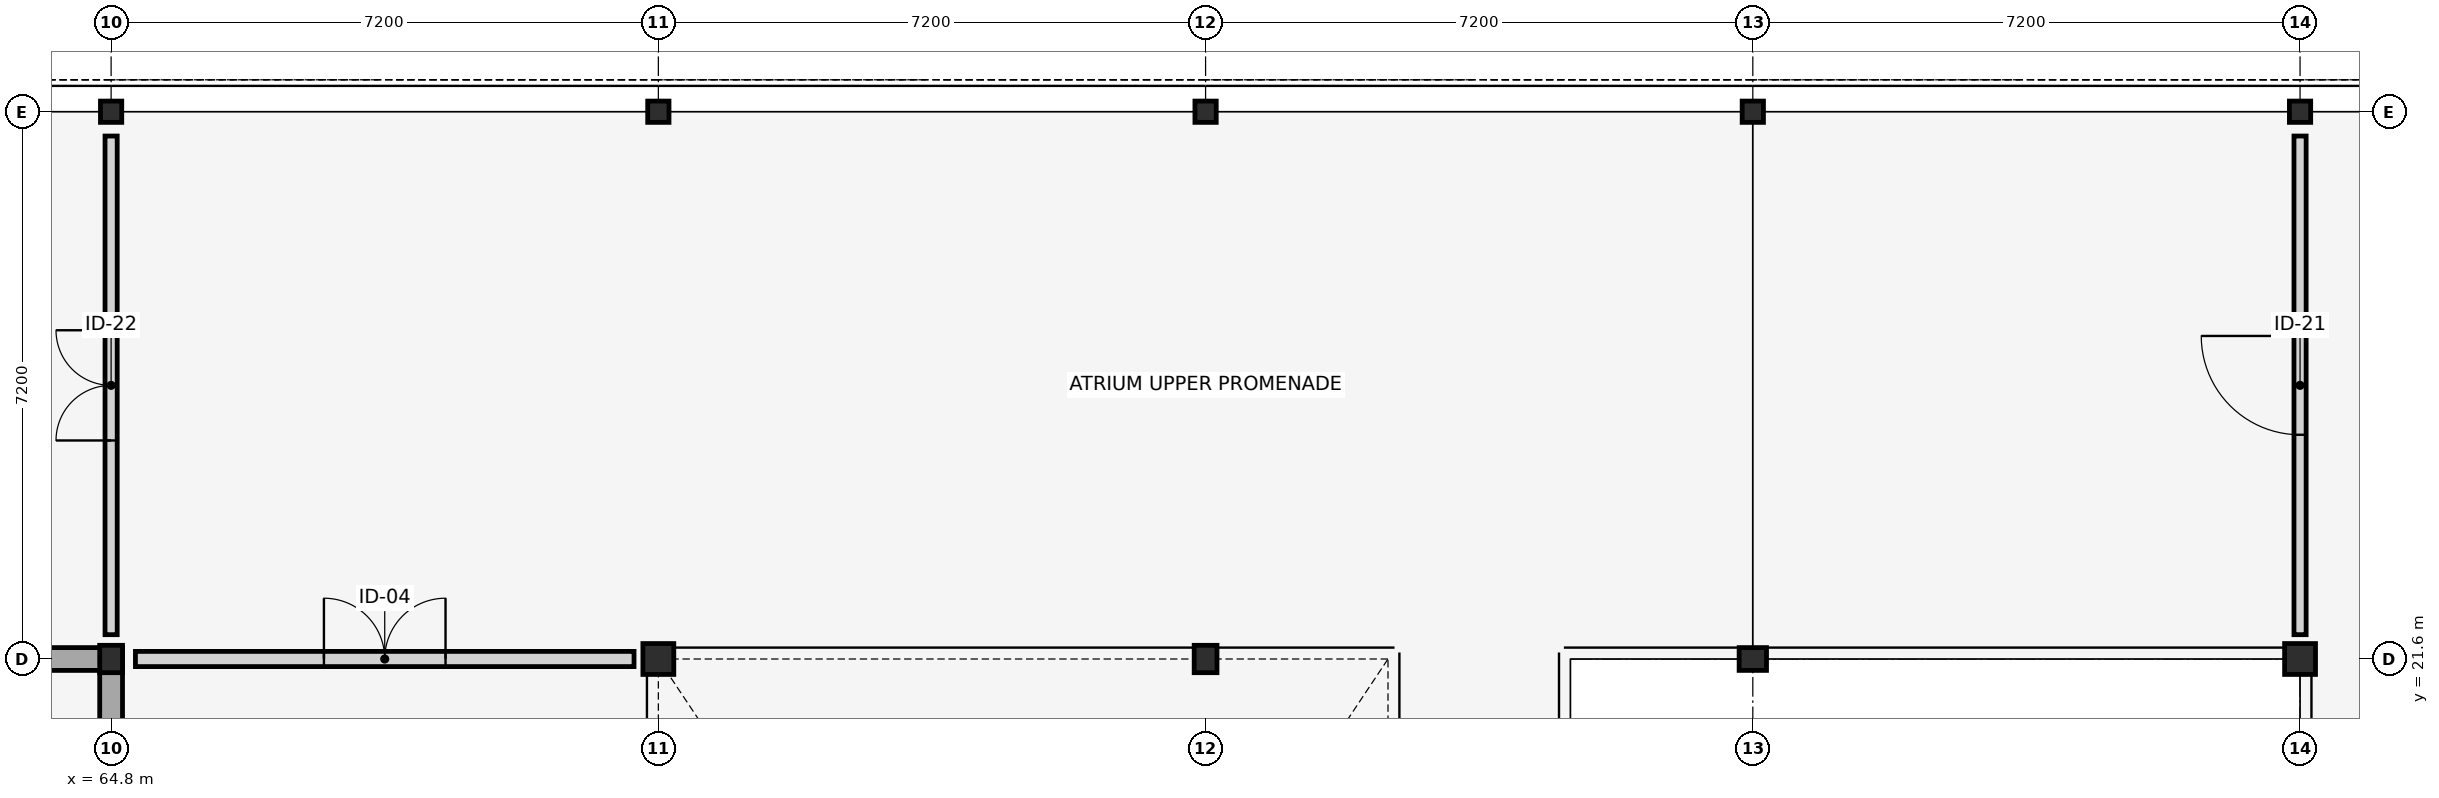
"""IFC4 building model, lengths in metres.
Left out: names, types, materials, properties, quantities, classifications, styles, units other than length and angle.
Written with IfcOpenShell. Run it as: python <this file> out.ifc"""

import sys

from ifc_helpers import new_model, si_unit, direction, frame, frame_2d, origin, origin_2d, place, context, subcontext, project, spatial, rectangle, hollow_circle, i_section, extrude, element, fill, save


model = new_model("IFC4")
c1 = context("Model", 3, precision=1e-05, world=origin(), true_north=direction((0.0, 1.0)))
c2 = subcontext(c1, "Body", "Model", "MODEL_VIEW")
j1 = project(units=[si_unit("LENGTHUNIT", "METRE"), si_unit("PLANEANGLEUNIT", "RADIAN")], contexts=[c1])
p1 = place(None, origin())
s1 = spatial("IfcSite", under=j1, at=p1, CompositionType="ELEMENT")
p2 = place(p1, origin())
s2 = spatial("IfcBuilding", under=s1, at=p2, CompositionType="ELEMENT")
p3 = place(p2, frame((0.0, 0.0, 12.9)))
s3 = spatial("IfcBuildingStorey", under=s2, at=p3, CompositionType="ELEMENT", Elevation=12.9)
p4 = place(p3, frame((64.8, 21.6, 0.0), z_axis=(0.0, 0.0, 1.0), x_axis=(1.0, 0.0, 0.0)))
e1 = element("IfcColumn", 1, at=p4, inside=s3, PredefinedType="COLUMN", context=c2, shape_type="SweptSolid", body=[
    extrude(i_section(OverallWidth=0.3, OverallDepth=0.36, WebThickness=0.012, FlangeThickness=0.022, FilletRadius=0.027, at=origin_2d()), origin(), (0.0, 0.0, 1.0), 4.2),
])
p5 = place(p3, frame((64.8, 28.8, 0.0), z_axis=(0.0, 0.0, 1.0), x_axis=(0.0, 1.0, 0.0)))
e2 = element("IfcColumn", 2, at=p5, inside=s3, PredefinedType="COLUMN", context=c2, shape_type="SweptSolid", body=[
    extrude(i_section(OverallWidth=0.28, OverallDepth=0.28, WebThickness=0.01, FlangeThickness=0.018, FilletRadius=0.024, at=origin_2d()), origin(), (0.0, 0.0, 1.0), 4.2),
])
p6 = place(p3, frame((72.0, 21.6, 0.0), z_axis=(0.0, 0.0, 1.0), x_axis=(0.0, 1.0, 0.0)))
e3 = element("IfcColumn", 3, at=p6, inside=s3, PredefinedType="COLUMN", context=c2, shape_type="SweptSolid", body=[
    extrude(hollow_circle(Radius=0.203, WallThickness=0.016, at=origin_2d()), origin(), (0.0, 0.0, 1.0), 4.2),
])
p7 = place(p3, frame((72.0, 28.8, 0.0), z_axis=(0.0, 0.0, 1.0), x_axis=(1.0, 0.0, 0.0)))
e4 = element("IfcColumn", 4, at=p7, inside=s3, PredefinedType="COLUMN", context=c2, shape_type="SweptSolid", body=[
    extrude(i_section(OverallWidth=0.28, OverallDepth=0.28, WebThickness=0.01, FlangeThickness=0.018, FilletRadius=0.024, at=origin_2d()), origin(), (0.0, 0.0, 1.0), 4.2),
])
p8 = place(p3, frame((79.2, 21.6, 0.0), z_axis=(0.0, 0.0, 1.0), x_axis=(1.0, 0.0, 0.0)))
e5 = element("IfcColumn", 5, at=p8, inside=s3, PredefinedType="COLUMN", context=c2, shape_type="SweptSolid", body=[
    extrude(i_section(OverallWidth=0.3, OverallDepth=0.36, WebThickness=0.012, FlangeThickness=0.022, FilletRadius=0.027, at=origin_2d()), origin(), (0.0, 0.0, 1.0), 4.2),
])
p9 = place(p3, frame((79.2, 28.8, 0.0), z_axis=(0.0, 0.0, 1.0), x_axis=(0.0, 1.0, 0.0)))
e6 = element("IfcColumn", 6, at=p9, inside=s3, PredefinedType="COLUMN", context=c2, shape_type="SweptSolid", body=[
    extrude(i_section(OverallWidth=0.28, OverallDepth=0.28, WebThickness=0.01, FlangeThickness=0.018, FilletRadius=0.024, at=origin_2d()), origin(), (0.0, 0.0, 1.0), 4.2),
])
p10 = place(p3, frame((86.4, 21.6, 0.0), z_axis=(0.0, 0.0, 1.0), x_axis=(0.0, 1.0, 0.0)))
e7 = element("IfcColumn", 7, at=p10, inside=s3, PredefinedType="COLUMN", context=c2, shape_type="SweptSolid", body=[
    extrude(i_section(OverallWidth=0.3, OverallDepth=0.36, WebThickness=0.012, FlangeThickness=0.022, FilletRadius=0.027, at=origin_2d()), origin(), (0.0, 0.0, 1.0), 4.2),
])
p11 = place(p3, frame((86.4, 28.8, 0.0), z_axis=(0.0, 0.0, 1.0), x_axis=(1.0, 0.0, 0.0)))
e8 = element("IfcColumn", 8, at=p11, inside=s3, PredefinedType="COLUMN", context=c2, shape_type="SweptSolid", body=[
    extrude(i_section(OverallWidth=0.28, OverallDepth=0.28, WebThickness=0.01, FlangeThickness=0.018, FilletRadius=0.024, at=origin_2d()), origin(), (0.0, 0.0, 1.0), 4.2),
])
p12 = place(p3, frame((93.6, 21.6, 0.0), z_axis=(0.0, 0.0, 1.0), x_axis=(1.0, 0.0, 0.0)))
e9 = element("IfcColumn", 9, at=p12, inside=s3, PredefinedType="COLUMN", context=c2, shape_type="SweptSolid", body=[
    extrude(hollow_circle(Radius=0.203, WallThickness=0.016, at=origin_2d()), origin(), (0.0, 0.0, 1.0), 4.2),
])
p13 = place(p3, frame((93.6, 28.8, 0.0), z_axis=(0.0, 0.0, 1.0), x_axis=(0.0, 1.0, 0.0)))
e10 = element("IfcColumn", 10, at=p13, inside=s3, PredefinedType="COLUMN", context=c2, shape_type="SweptSolid", body=[
    extrude(i_section(OverallWidth=0.28, OverallDepth=0.28, WebThickness=0.01, FlangeThickness=0.018, FilletRadius=0.024, at=origin_2d()), origin(), (0.0, 0.0, 1.0), 4.2),
])
p14 = place(p3, frame((57.6, 21.6, 0.0), z_axis=(0.0, 0.0, 1.0), x_axis=(1.0, 0.0, 0.0)))
e11 = element("IfcWall", 11, at=p14, inside=s3, PredefinedType="SHEAR", context=c2, shape_type="SweptSolid", body=[
    extrude(rectangle(XDim=7.35, YDim=0.3, at=frame_2d((3.675, 0.0))), origin(), (0.0, 0.0, 1.0), 3.96),
])
p15 = place(p3, frame((64.8, 7.35, 0.0), z_axis=(0.0, 0.0, 1.0), x_axis=(0.0, 1.0, 0.0)))
e12 = element("IfcWall", 12, at=p15, inside=s3, PredefinedType="SHEAR", context=c2, shape_type="SweptSolid", body=[
    extrude(rectangle(XDim=14.1, YDim=0.3, at=frame_2d((7.05, 0.0))), origin(), (0.0, 0.0, 1.0), 3.96),
])
p16 = place(p15, frame((3.55, 0.0, 0.0)))
e13 = element("IfcOpeningElement", 13, at=p16, cuts=e12, PredefinedType="OPENING", context=c2, shape_type="SweptSolid", body=[
    extrude(rectangle(XDim=1.3, YDim=2.2, at=frame_2d((0.65, 1.1))), frame((0.0, 0.16, 0.0), z_axis=(0.0, -1.0, 0.0), x_axis=(1.0, 0.0, 0.0)), (0.0, 0.0, 1.0), 0.32),
])
p17 = place(p15, frame((7.85, 0.0, 0.0)))
e14 = element("IfcOpeningElement", 14, at=p17, cuts=e12, PredefinedType="OPENING", context=c2, shape_type="SweptSolid", body=[
    extrude(rectangle(XDim=1.05, YDim=2.15, at=frame_2d((0.525, 1.075))), frame((0.0, 0.16, 0.0), z_axis=(0.0, -1.0, 0.0), x_axis=(1.0, 0.0, 0.0)), (0.0, 0.0, 1.0), 0.32),
])
p18 = place(p15, frame((10.55, 0.0, 0.0)))
e15 = element("IfcOpeningElement", 15, at=p18, cuts=e12, PredefinedType="OPENING", context=c2, shape_type="SweptSolid", body=[
    extrude(rectangle(XDim=1.0, YDim=2.15, at=frame_2d((0.5, 1.075))), frame((0.0, 0.16, 0.0), z_axis=(0.0, -1.0, 0.0), x_axis=(1.0, 0.0, 0.0)), (0.0, 0.0, 1.0), 0.32),
])
p19 = place(p3, frame((65.12, 21.6, 0.0), z_axis=(0.0, 0.0, 1.0), x_axis=(1.0, 0.0, 0.0)))
e16 = element("IfcWall", 16, at=p19, inside=s3, PredefinedType="PARTITIONING", context=c2, shape_type="SweptSolid", body=[
    extrude(rectangle(XDim=6.56, YDim=0.2, at=frame_2d((3.28, 0.0))), origin(), (0.0, 0.0, 1.0), 3.15),
])
p20 = place(p19, frame((2.48, 0.0, 0.0)))
e17 = element("IfcOpeningElement", 17, at=p20, cuts=e16, PredefinedType="OPENING", context=c2, shape_type="SweptSolid", body=[
    extrude(rectangle(XDim=1.6, YDim=2.35, at=frame_2d((0.8, 1.175))), frame((0.0, 0.11, 0.0), z_axis=(0.0, -1.0, 0.0), x_axis=(1.0, 0.0, 0.0)), (0.0, 0.0, 1.0), 0.22),
])
p21 = place(p3, frame((93.6, 21.92, 0.0), z_axis=(0.0, 0.0, 1.0), x_axis=(0.0, 1.0, 0.0)))
e18 = element("IfcWall", 18, at=p21, inside=s3, PredefinedType="PARTITIONING", context=c2, shape_type="SweptSolid", body=[
    extrude(rectangle(XDim=6.56, YDim=0.16, at=frame_2d((3.28, 0.0))), origin(), (0.0, 0.0, 1.0), 3.15),
])
p22 = place(p21, frame((2.63, 0.0, 0.0)))
e19 = element("IfcOpeningElement", 19, at=p22, cuts=e18, PredefinedType="OPENING", context=c2, shape_type="SweptSolid", body=[
    extrude(rectangle(XDim=1.3, YDim=2.45, at=frame_2d((0.65, 1.225))), frame((0.0, 0.09, 0.0), z_axis=(0.0, -1.0, 0.0), x_axis=(1.0, 0.0, 0.0)), (0.0, 0.0, 1.0), 0.18),
])
p23 = place(p3, frame((64.8, 21.92, 0.0), z_axis=(0.0, 0.0, 1.0), x_axis=(0.0, 1.0, 0.0)))
e20 = element("IfcWall", 20, at=p23, inside=s3, PredefinedType="PARTITIONING", context=c2, shape_type="SweptSolid", body=[
    extrude(rectangle(XDim=6.56, YDim=0.16, at=frame_2d((3.28, 0.0))), origin(), (0.0, 0.0, 1.0), 3.15),
])
p24 = place(p23, frame((2.555, 0.0, 0.0)))
e21 = element("IfcOpeningElement", 21, at=p24, cuts=e20, PredefinedType="OPENING", context=c2, shape_type="SweptSolid", body=[
    extrude(rectangle(XDim=1.45, YDim=2.35, at=frame_2d((0.725, 1.175))), frame((0.0, 0.09, 0.0), z_axis=(0.0, -1.0, 0.0), x_axis=(1.0, 0.0, 0.0)), (0.0, 0.0, 1.0), 0.18),
])
p25 = place(p20, origin())
e22 = element("IfcDoor", 22, at=p25, inside=s3, OperationType="DOUBLE_DOOR_SINGLE_SWING", PredefinedType="DOOR", context=c2, shape_type="SweptSolid", body=[
    extrude(rectangle(XDim=1.6, YDim=2.35, at=frame_2d((0.8, 1.175))), frame((0.0, 0.025, 0.0), z_axis=(0.0, -1.0, 0.0), x_axis=(1.0, 0.0, 0.0)), (0.0, 0.0, 1.0), 0.05),
])
fill(e17, e22)
p26 = place(p22, origin())
e23 = element("IfcDoor", 23, at=p26, inside=s3, OperationType="SINGLE_SWING_RIGHT", PredefinedType="DOOR", context=c2, shape_type="SweptSolid", body=[
    extrude(rectangle(XDim=1.3, YDim=2.45, at=frame_2d((0.65, 1.225))), frame((0.0, 0.025, 0.0), z_axis=(0.0, -1.0, 0.0), x_axis=(1.0, 0.0, 0.0)), (0.0, 0.0, 1.0), 0.05),
])
fill(e19, e23)
p27 = place(p24, origin())
e24 = element("IfcDoor", 24, at=p27, inside=s3, OperationType="DOUBLE_DOOR_SINGLE_SWING", PredefinedType="DOOR", context=c2, shape_type="SweptSolid", body=[
    extrude(rectangle(XDim=1.45, YDim=2.35, at=frame_2d((0.725, 1.175))), frame((0.0, 0.025, 0.0), z_axis=(0.0, -1.0, 0.0), x_axis=(1.0, 0.0, 0.0)), (0.0, 0.0, 1.0), 0.05),
])
fill(e21, e24)
save(model, sys.argv[1])
